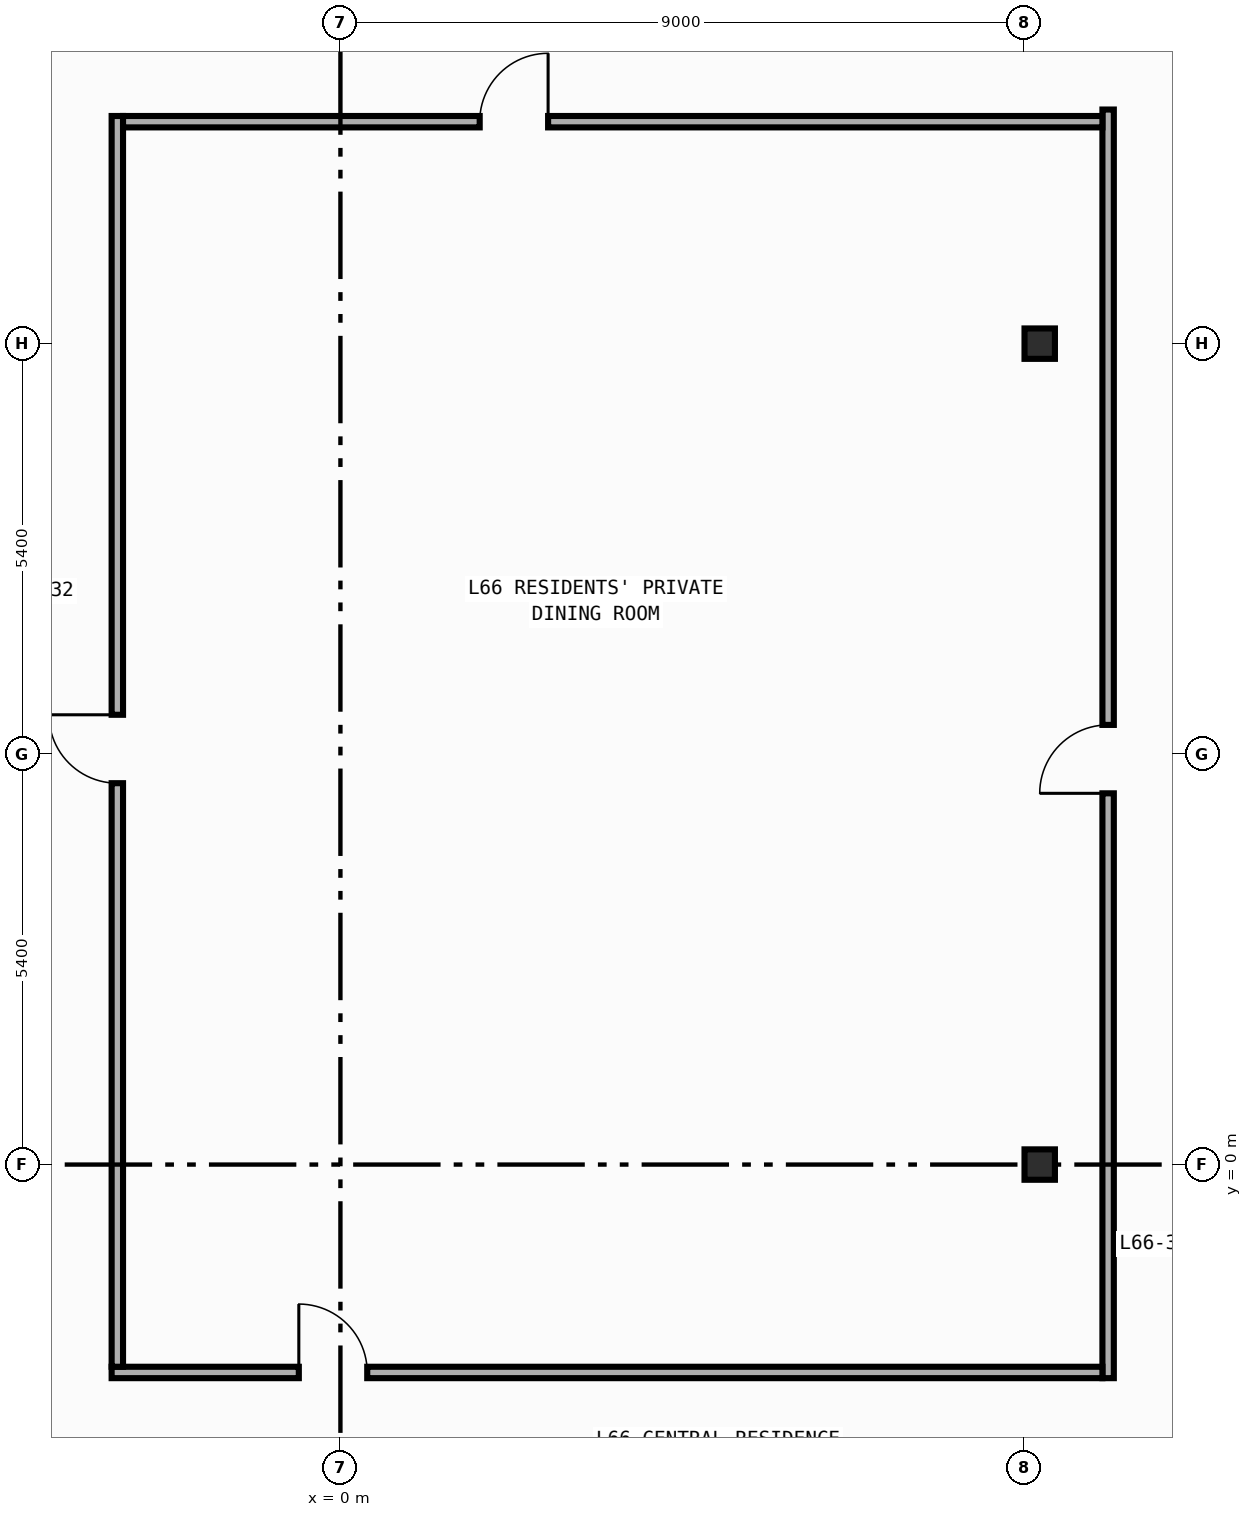
"""IFC4 building model, lengths in metres.
Left out: names, types, materials, properties, quantities, classifications, styles, units other than length and angle.
Written with IfcOpenShell. Run it as: python <this file> out.ifc"""

import sys

from ifc_helpers import new_model, si_unit, direction, frame, frame_2d, origin, origin_2d, place, context, subcontext, project, spatial, rectangle, i_section, extrude, element, fill, save


model = new_model("IFC4")
c1 = context("Model", 3, precision=1e-05, world=origin(), true_north=direction((0.0, 1.0)))
c2 = subcontext(c1, "Body", "Model", "MODEL_VIEW")
j1 = project(units=[si_unit("LENGTHUNIT", "METRE"), si_unit("PLANEANGLEUNIT", "RADIAN")], contexts=[c1])
p1 = place(None, origin())
s1 = spatial("IfcSite", under=j1, at=p1, CompositionType="ELEMENT")
p2 = place(p1, origin())
s2 = spatial("IfcBuilding", under=s1, at=p2, CompositionType="ELEMENT")
p3 = place(p2, frame((0.0, 0.0, 277.6)))
s3 = spatial("IfcBuildingStorey", under=s2, at=p3, CompositionType="ELEMENT", Elevation=277.6)
for number, where, z_axis, x_axis in (
    (1, (9.2, 0.0, 0.0), (0.0, 0.0, 1.0), (1.0, 0.0, 0.0)),
    (2, (9.2, 10.8, 0.0), (0.0, 0.0, 1.0), (1.0, 0.0, 0.0)),
):
    element("IfcColumn", number, at=place(p3, frame(where, z_axis=z_axis, x_axis=x_axis)), inside=s3, PredefinedType="COLUMN", context=c2, shape_type="SweptSolid", body=[
        extrude(i_section(OverallWidth=0.4, OverallDepth=0.4, WebThickness=0.013, FlangeThickness=0.021, FilletRadius=0.022, at=origin_2d()), origin(), (0.0, 0.0, 1.0), 3.8),
    ])
p4 = place(p3, frame((10.1, -2.81, 0.0), z_axis=(0.0, 0.0, 1.0), x_axis=(0.0, 1.0, 0.0)))
e3 = element("IfcWall", 3, at=p4, inside=s3, PredefinedType="PARTITIONING", context=c2, shape_type="SweptSolid", body=[
    extrude(rectangle(XDim=16.69, YDim=0.15, at=frame_2d((8.345, 0.0))), origin(), (0.0, 0.0, 1.0), 3.54),
])
p5 = place(p4, frame((7.694, 0.0, 0.0)))
e4 = element("IfcOpeningElement", 4, at=p5, cuts=e3, PredefinedType="OPENING", context=c2, shape_type="SweptSolid", body=[
    extrude(rectangle(XDim=0.9, YDim=2.15, at=frame_2d((0.45, 1.075))), frame((0.0, 0.085, 0.0), z_axis=(0.0, -1.0, 0.0), x_axis=(1.0, 0.0, 0.0)), (0.0, 0.0, 1.0), 0.17),
])
p6 = place(p3, frame((-3.01, -2.735, 0.0), z_axis=(0.0, 0.0, 1.0), x_axis=(1.0, 0.0, 0.0)))
e5 = element("IfcWall", 5, at=p6, inside=s3, PredefinedType="PARTITIONING", context=c2, shape_type="SweptSolid", body=[
    extrude(rectangle(XDim=13.035, YDim=0.15, at=frame_2d((6.518, 0.0))), origin(), (0.0, 0.0, 1.0), 3.54),
])
p7 = place(p6, frame((2.463, 0.0, 0.0)))
e6 = element("IfcOpeningElement", 6, at=p7, cuts=e5, PredefinedType="OPENING", context=c2, shape_type="SweptSolid", body=[
    extrude(rectangle(XDim=0.9, YDim=2.15, at=frame_2d((0.45, 1.075))), frame((0.0, 0.085, 0.0), z_axis=(0.0, -1.0, 0.0), x_axis=(1.0, 0.0, 0.0)), (0.0, 0.0, 1.0), 0.17),
])
p8 = place(p3, frame((-2.935, -2.66, 0.0), z_axis=(0.0, 0.0, 1.0), x_axis=(0.0, 1.0, 0.0)))
e7 = element("IfcWall", 7, at=p8, inside=s3, PredefinedType="PARTITIONING", context=c2, shape_type="SweptSolid", body=[
    extrude(rectangle(XDim=16.455, YDim=0.15, at=frame_2d((8.228, 0.0))), origin(), (0.0, 0.0, 1.0), 3.54),
])
p9 = place(p8, frame((7.677, 0.0, 0.0)))
e8 = element("IfcOpeningElement", 8, at=p9, cuts=e7, PredefinedType="OPENING", context=c2, shape_type="SweptSolid", body=[
    extrude(rectangle(XDim=0.9, YDim=2.15, at=frame_2d((0.45, 1.075))), frame((0.0, 0.085, 0.0), z_axis=(0.0, -1.0, 0.0), x_axis=(1.0, 0.0, 0.0)), (0.0, 0.0, 1.0), 0.17),
])
p10 = place(p3, frame((-2.86, 13.72, 0.0), z_axis=(0.0, 0.0, 1.0), x_axis=(1.0, 0.0, 0.0)))
e9 = element("IfcWall", 9, at=p10, inside=s3, PredefinedType="PARTITIONING", context=c2, shape_type="SweptSolid", body=[
    extrude(rectangle(XDim=12.885, YDim=0.15, at=frame_2d((6.442, 0.0))), origin(), (0.0, 0.0, 1.0), 3.54),
])
p11 = place(p10, frame((4.692, 0.0, 0.0)))
e10 = element("IfcOpeningElement", 10, at=p11, cuts=e9, PredefinedType="OPENING", context=c2, shape_type="SweptSolid", body=[
    extrude(rectangle(XDim=0.9, YDim=2.15, at=frame_2d((0.45, 1.075))), frame((0.0, 0.085, 0.0), z_axis=(0.0, -1.0, 0.0), x_axis=(1.0, 0.0, 0.0)), (0.0, 0.0, 1.0), 0.17),
])
p12 = place(p5, origin())
e11 = element("IfcDoor", 11, at=p12, inside=s3, OperationType="SINGLE_SWING_LEFT", PredefinedType="DOOR", context=c2, shape_type="SweptSolid", body=[
    extrude(rectangle(XDim=0.9, YDim=2.15, at=frame_2d((0.45, 1.075))), frame((0.0, 0.025, 0.0), z_axis=(0.0, -1.0, 0.0), x_axis=(1.0, 0.0, 0.0)), (0.0, 0.0, 1.0), 0.05),
])
fill(e4, e11)
p13 = place(p7, origin())
e12 = element("IfcDoor", 12, at=p13, inside=s3, OperationType="SINGLE_SWING_LEFT", PredefinedType="DOOR", context=c2, shape_type="SweptSolid", body=[
    extrude(rectangle(XDim=0.9, YDim=2.15, at=frame_2d((0.45, 1.075))), frame((0.0, 0.025, 0.0), z_axis=(0.0, -1.0, 0.0), x_axis=(1.0, 0.0, 0.0)), (0.0, 0.0, 1.0), 0.05),
])
fill(e6, e12)
p14 = place(p9, origin())
e13 = element("IfcDoor", 13, at=p14, inside=s3, OperationType="SINGLE_SWING_RIGHT", PredefinedType="DOOR", context=c2, shape_type="SweptSolid", body=[
    extrude(rectangle(XDim=0.9, YDim=2.15, at=frame_2d((0.45, 1.075))), frame((0.0, 0.025, 0.0), z_axis=(0.0, -1.0, 0.0), x_axis=(1.0, 0.0, 0.0)), (0.0, 0.0, 1.0), 0.05),
])
fill(e8, e13)
p15 = place(p11, origin())
e14 = element("IfcDoor", 14, at=p15, inside=s3, OperationType="SINGLE_SWING_RIGHT", PredefinedType="DOOR", context=c2, shape_type="SweptSolid", body=[
    extrude(rectangle(XDim=0.9, YDim=2.15, at=frame_2d((0.45, 1.075))), frame((0.0, 0.025, 0.0), z_axis=(0.0, -1.0, 0.0), x_axis=(1.0, 0.0, 0.0)), (0.0, 0.0, 1.0), 0.05),
])
fill(e10, e14)
save(model, sys.argv[1])
